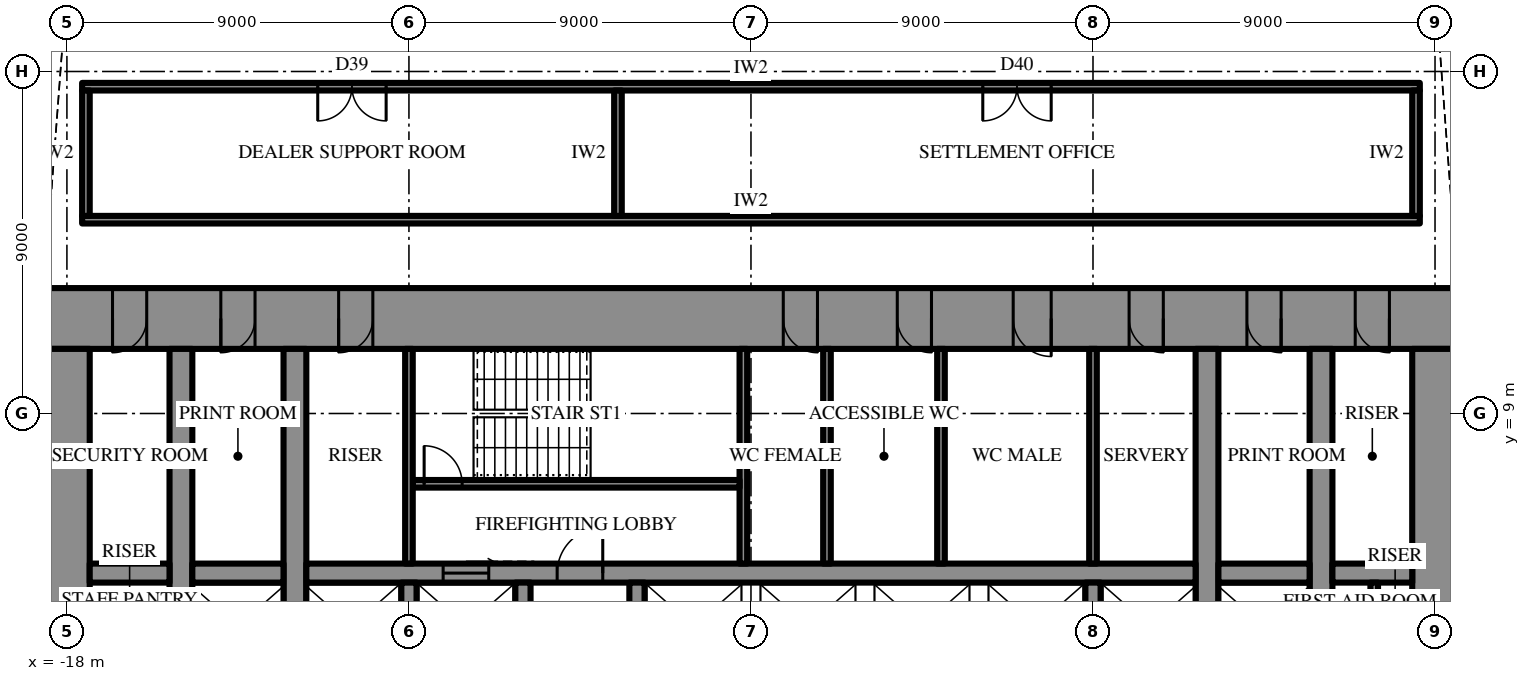
"""IFC4 building model, lengths in metres.
Left out: names, types, materials, properties, quantities, classifications, styles, units other than length and angle.
Written with IfcOpenShell. Run it as: python <this file> out.ifc"""

import sys

from ifc_helpers import new_model, si_unit, direction, frame, frame_2d, origin, place, context, subcontext, project, spatial, rectangle, extrude, element, fill, save


model = new_model("IFC4")
c1 = context("Model", 3, precision=1e-05, world=origin(), true_north=direction((0.0, 1.0)))
c2 = subcontext(c1, "Body", "Model", "MODEL_VIEW")
j1 = project(units=[si_unit("LENGTHUNIT", "METRE"), si_unit("PLANEANGLEUNIT", "RADIAN")], contexts=[c1])
p1 = place(None, origin())
s1 = spatial("IfcSite", under=j1, at=p1, CompositionType="ELEMENT")
p2 = place(p1, origin())
s2 = spatial("IfcBuilding", under=s1, at=p2, CompositionType="ELEMENT")
p3 = place(p2, frame((0.0, 0.0, 140.5)))
s3 = spatial("IfcBuildingStorey", under=s2, at=p3, CompositionType="ELEMENT", Elevation=140.5)
p4 = place(p3, frame((-18.6, 11.5, 0.0), z_axis=(0.0, 0.0, 1.0), x_axis=(1.0, 0.0, 0.0)))
e1 = element("IfcWall", 1, at=p4, inside=s3, PredefinedType="SHEAR", context=c2, shape_type="SweptSolid", body=[
    extrude(rectangle(XDim=37.2, YDim=1.6, at=frame_2d((18.6, 0.0))), origin(), (0.0, 0.0, 1.0), 4.2),
])
p5 = place(p4, frame((19.45, 0.0, 0.0)))
e2 = element("IfcOpeningElement", 2, at=p5, cuts=e1, PredefinedType="OPENING", context=c2, shape_type="SweptSolid", body=[
    extrude(rectangle(XDim=0.9, YDim=2.2, at=frame_2d((0.45, 1.1))), frame((0.0, 0.81, 0.0), z_axis=(0.0, -1.0, 0.0), x_axis=(1.0, 0.0, 0.0)), (0.0, 0.0, 1.0), 1.62),
])
p6 = place(p4, frame((22.45, 0.0, 0.0)))
e3 = element("IfcOpeningElement", 3, at=p6, cuts=e1, PredefinedType="OPENING", context=c2, shape_type="SweptSolid", body=[
    extrude(rectangle(XDim=0.9, YDim=2.2, at=frame_2d((0.45, 1.1))), frame((0.0, 0.81, 0.0), z_axis=(0.0, -1.0, 0.0), x_axis=(1.0, 0.0, 0.0)), (0.0, 0.0, 1.0), 1.62),
])
p7 = place(p4, frame((25.5, 0.0, 0.0)))
e4 = element("IfcOpeningElement", 4, at=p7, cuts=e1, PredefinedType="OPENING", context=c2, shape_type="SweptSolid", body=[
    extrude(rectangle(XDim=1.0, YDim=2.2, at=frame_2d((0.5, 1.1))), frame((0.0, 0.81, 0.0), z_axis=(0.0, -1.0, 0.0), x_axis=(1.0, 0.0, 0.0)), (0.0, 0.0, 1.0), 1.62),
])
p8 = place(p4, frame((1.8, 0.0, 0.0)))
e5 = element("IfcOpeningElement", 5, at=p8, cuts=e1, PredefinedType="OPENING", context=c2, shape_type="SweptSolid", body=[
    extrude(rectangle(XDim=0.9, YDim=2.2, at=frame_2d((0.45, 1.1))), frame((0.0, 0.81, 0.0), z_axis=(0.0, -1.0, 0.0), x_axis=(1.0, 0.0, 0.0)), (0.0, 0.0, 1.0), 1.62),
])
p9 = place(p4, frame((4.65, 0.0, 0.0)))
e6 = element("IfcOpeningElement", 6, at=p9, cuts=e1, PredefinedType="OPENING", context=c2, shape_type="SweptSolid", body=[
    extrude(rectangle(XDim=0.9, YDim=2.2, at=frame_2d((0.45, 1.1))), frame((0.0, 0.81, 0.0), z_axis=(0.0, -1.0, 0.0), x_axis=(1.0, 0.0, 0.0)), (0.0, 0.0, 1.0), 1.62),
])
p10 = place(p4, frame((7.75, 0.0, 0.0)))
e7 = element("IfcOpeningElement", 7, at=p10, cuts=e1, PredefinedType="OPENING", context=c2, shape_type="SweptSolid", body=[
    extrude(rectangle(XDim=0.9, YDim=2.2, at=frame_2d((0.45, 1.1))), frame((0.0, 0.81, 0.0), z_axis=(0.0, -1.0, 0.0), x_axis=(1.0, 0.0, 0.0)), (0.0, 0.0, 1.0), 1.62),
])
p11 = place(p4, frame((28.55, 0.0, 0.0)))
e8 = element("IfcOpeningElement", 8, at=p11, cuts=e1, PredefinedType="OPENING", context=c2, shape_type="SweptSolid", body=[
    extrude(rectangle(XDim=0.9, YDim=2.2, at=frame_2d((0.45, 1.1))), frame((0.0, 0.81, 0.0), z_axis=(0.0, -1.0, 0.0), x_axis=(1.0, 0.0, 0.0)), (0.0, 0.0, 1.0), 1.62),
])
p12 = place(p4, frame((31.65, 0.0, 0.0)))
e9 = element("IfcOpeningElement", 9, at=p12, cuts=e1, PredefinedType="OPENING", context=c2, shape_type="SweptSolid", body=[
    extrude(rectangle(XDim=0.9, YDim=2.2, at=frame_2d((0.45, 1.1))), frame((0.0, 0.81, 0.0), z_axis=(0.0, -1.0, 0.0), x_axis=(1.0, 0.0, 0.0)), (0.0, 0.0, 1.0), 1.62),
])
p13 = place(p4, frame((34.5, 0.0, 0.0)))
e10 = element("IfcOpeningElement", 10, at=p13, cuts=e1, PredefinedType="OPENING", context=c2, shape_type="SweptSolid", body=[
    extrude(rectangle(XDim=0.9, YDim=2.2, at=frame_2d((0.45, 1.1))), frame((0.0, 0.81, 0.0), z_axis=(0.0, -1.0, 0.0), x_axis=(1.0, 0.0, 0.0)), (0.0, 0.0, 1.0), 1.62),
])
p14 = place(p3, frame((18.0, -10.7, 0.0), z_axis=(0.0, 0.0, 1.0), x_axis=(0.0, 1.0, 0.0)))
e11 = element("IfcWall", 11, at=p14, inside=s3, PredefinedType="SHEAR", context=c2, shape_type="SweptSolid", body=[
    extrude(rectangle(XDim=21.4, YDim=1.2, at=frame_2d((10.7, 0.0))), origin(), (0.0, 0.0, 1.0), 4.2),
])
p15 = place(p14, frame((9.8, 0.0, 0.0)))
e12 = element("IfcOpeningElement", 12, at=p15, cuts=e11, PredefinedType="OPENING", context=c2, shape_type="SweptSolid", body=[
    extrude(rectangle(XDim=1.8, YDim=2.4, at=frame_2d((0.9, 1.2))), frame((0.0, 0.61, 0.0), z_axis=(0.0, -1.0, 0.0), x_axis=(1.0, 0.0, 0.0)), (0.0, 0.0, 1.0), 1.22),
])
p16 = place(p3, frame((-18.0, 10.7, 0.0), z_axis=(0.0, 0.0, 1.0), x_axis=(0.0, -1.0, 0.0)))
e13 = element("IfcWall", 13, at=p16, inside=s3, PredefinedType="SHEAR", context=c2, shape_type="SweptSolid", body=[
    extrude(rectangle(XDim=21.4, YDim=1.2, at=frame_2d((10.7, 0.0))), origin(), (0.0, 0.0, 1.0), 4.2),
])
p17 = place(p16, frame((9.8, 0.0, 0.0)))
e14 = element("IfcOpeningElement", 14, at=p17, cuts=e13, PredefinedType="OPENING", context=c2, shape_type="SweptSolid", body=[
    extrude(rectangle(XDim=1.8, YDim=2.4, at=frame_2d((0.9, 1.2))), frame((0.0, 0.61, 0.0), z_axis=(0.0, -1.0, 0.0), x_axis=(1.0, 0.0, 0.0)), (0.0, 0.0, 1.0), 1.22),
])
p18 = place(p3, frame((12.0, -10.7, 0.0), z_axis=(0.0, 0.0, 1.0), x_axis=(0.0, 1.0, 0.0)))
e15 = element("IfcWall", 15, at=p18, inside=s3, PredefinedType="SHEAR", context=c2, shape_type="SweptSolid", body=[
    extrude(rectangle(XDim=21.4, YDim=0.6, at=frame_2d((10.7, 0.0))), origin(), (0.0, 0.0, 1.0), 4.2),
])
p19 = place(p18, frame((9.8, 0.0, 0.0)))
e16 = element("IfcOpeningElement", 16, at=p19, cuts=e15, PredefinedType="OPENING", context=c2, shape_type="SweptSolid", body=[
    extrude(rectangle(XDim=1.8, YDim=2.4, at=frame_2d((0.9, 1.2))), frame((0.0, 0.31, 0.0), z_axis=(0.0, -1.0, 0.0), x_axis=(1.0, 0.0, 0.0)), (0.0, 0.0, 1.0), 0.62),
])
p20 = place(p3, frame((-12.0, -10.7, 0.0), z_axis=(0.0, 0.0, 1.0), x_axis=(0.0, 1.0, 0.0)))
e17 = element("IfcWall", 17, at=p20, inside=s3, PredefinedType="SHEAR", context=c2, shape_type="SweptSolid", body=[
    extrude(rectangle(XDim=21.4, YDim=0.6, at=frame_2d((10.7, 0.0))), origin(), (0.0, 0.0, 1.0), 4.2),
])
p21 = place(p20, frame((9.8, 0.0, 0.0)))
e18 = element("IfcOpeningElement", 18, at=p21, cuts=e17, PredefinedType="OPENING", context=c2, shape_type="SweptSolid", body=[
    extrude(rectangle(XDim=1.8, YDim=2.4, at=frame_2d((0.9, 1.2))), frame((0.0, 0.31, 0.0), z_axis=(0.0, -1.0, 0.0), x_axis=(1.0, 0.0, 0.0)), (0.0, 0.0, 1.0), 0.62),
])
p22 = place(p3, frame((15.0, -10.7, 0.0), z_axis=(0.0, 0.0, 1.0), x_axis=(0.0, 1.0, 0.0)))
e19 = element("IfcWall", 19, at=p22, inside=s3, PredefinedType="SHEAR", context=c2, shape_type="SweptSolid", body=[
    extrude(rectangle(XDim=21.4, YDim=0.6, at=frame_2d((10.7, 0.0))), origin(), (0.0, 0.0, 1.0), 4.2),
])
p23 = place(p22, frame((9.8, 0.0, 0.0)))
e20 = element("IfcOpeningElement", 20, at=p23, cuts=e19, PredefinedType="OPENING", context=c2, shape_type="SweptSolid", body=[
    extrude(rectangle(XDim=1.8, YDim=2.4, at=frame_2d((0.9, 1.2))), frame((0.0, 0.31, 0.0), z_axis=(0.0, -1.0, 0.0), x_axis=(1.0, 0.0, 0.0)), (0.0, 0.0, 1.0), 0.62),
])
p24 = place(p3, frame((-15.0, -10.7, 0.0), z_axis=(0.0, 0.0, 1.0), x_axis=(0.0, 1.0, 0.0)))
e21 = element("IfcWall", 21, at=p24, inside=s3, PredefinedType="SHEAR", context=c2, shape_type="SweptSolid", body=[
    extrude(rectangle(XDim=21.4, YDim=0.6, at=frame_2d((10.7, 0.0))), origin(), (0.0, 0.0, 1.0), 4.2),
])
p25 = place(p24, frame((9.8, 0.0, 0.0)))
e22 = element("IfcOpeningElement", 22, at=p25, cuts=e21, PredefinedType="OPENING", context=c2, shape_type="SweptSolid", body=[
    extrude(rectangle(XDim=1.8, YDim=2.4, at=frame_2d((0.9, 1.2))), frame((0.0, 0.31, 0.0), z_axis=(0.0, -1.0, 0.0), x_axis=(1.0, 0.0, 0.0)), (0.0, 0.0, 1.0), 0.62),
])
p26 = place(p3, frame((-17.4, 4.8, 0.0), z_axis=(0.0, 0.0, 1.0), x_axis=(1.0, 0.0, 0.0)))
e23 = element("IfcWall", 23, at=p26, inside=s3, PredefinedType="SHEAR", context=c2, shape_type="SweptSolid", body=[
    extrude(rectangle(XDim=2.1, YDim=0.5, at=frame_2d((1.05, 0.0))), origin(), (0.0, 0.0, 1.0), 4.2),
])
p27 = place(p3, frame((-14.7, 4.8, 0.0), z_axis=(0.0, 0.0, 1.0), x_axis=(1.0, 0.0, 0.0)))
e24 = element("IfcWall", 24, at=p27, inside=s3, PredefinedType="SHEAR", context=c2, shape_type="SweptSolid", body=[
    extrude(rectangle(XDim=2.4, YDim=0.5, at=frame_2d((1.2, 0.0))), origin(), (0.0, 0.0, 1.0), 4.2),
])
p28 = place(p3, frame((-11.7, 4.8, 0.0), z_axis=(0.0, 0.0, 1.0), x_axis=(1.0, 0.0, 0.0)))
e25 = element("IfcWall", 25, at=p28, inside=s3, PredefinedType="SHEAR", context=c2, shape_type="SweptSolid", body=[
    extrude(rectangle(XDim=23.4, YDim=0.5, at=frame_2d((11.7, 0.0))), origin(), (0.0, 0.0, 1.0), 4.2),
])
p29 = place(p28, frame((6.6, 0.0, 0.0)))
e26 = element("IfcOpeningElement", 26, at=p29, cuts=e25, PredefinedType="OPENING", context=c2, shape_type="SweptSolid", body=[
    extrude(rectangle(XDim=1.2, YDim=2.2, at=frame_2d((0.6, 1.1))), frame((0.0, 0.26, 0.0), z_axis=(0.0, -1.0, 0.0), x_axis=(1.0, 0.0, 0.0)), (0.0, 0.0, 1.0), 0.52),
])
p30 = place(p28, frame((3.6, 0.0, 0.0)))
e27 = element("IfcOpeningElement", 27, at=p30, cuts=e25, PredefinedType="OPENING", context=c2, shape_type="SweptSolid", body=[
    extrude(rectangle(XDim=1.2, YDim=2.2, at=frame_2d((0.6, 1.1))), frame((0.0, 0.26, 0.0), z_axis=(0.0, -1.0, 0.0), x_axis=(1.0, 0.0, 0.0)), (0.0, 0.0, 1.0), 0.52),
])
p31 = place(p3, frame((12.3, 4.8, 0.0), z_axis=(0.0, 0.0, 1.0), x_axis=(1.0, 0.0, 0.0)))
e28 = element("IfcWall", 28, at=p31, inside=s3, PredefinedType="SHEAR", context=c2, shape_type="SweptSolid", body=[
    extrude(rectangle(XDim=2.4, YDim=0.5, at=frame_2d((1.2, 0.0))), origin(), (0.0, 0.0, 1.0), 4.2),
])
p32 = place(p3, frame((15.3, 4.8, 0.0), z_axis=(0.0, 0.0, 1.0), x_axis=(1.0, 0.0, 0.0)))
e29 = element("IfcWall", 29, at=p32, inside=s3, PredefinedType="SHEAR", context=c2, shape_type="SweptSolid", body=[
    extrude(rectangle(XDim=2.1, YDim=0.5, at=frame_2d((1.05, 0.0))), origin(), (0.0, 0.0, 1.0), 4.2),
])
for number, where, z_axis, x_axis in (
    (30, (-9.0, 2.25, 0.0), (0.0, 0.0, 1.0), (0.0, 1.0, 0.0)),
    (31, (-6.0, 2.25, 0.0), (0.0, 0.0, 1.0), (0.0, 1.0, 0.0)),
    (32, (-3.0, 2.25, 0.0), (0.0, 0.0, 1.0), (0.0, 1.0, 0.0)),
    (33, (9.0, 2.25, 0.0), (0.0, 0.0, 1.0), (0.0, 1.0, 0.0)),
):
    element("IfcWall", number, at=place(p3, frame(where, z_axis=z_axis, x_axis=x_axis)), inside=s3, PredefinedType="SHEAR", context=c2, shape_type="SweptSolid", body=[
        extrude(rectangle(XDim=2.3, YDim=0.4, at=frame_2d((1.15, 0.0))), origin(), (0.0, 0.0, 1.0), 4.2),
    ])
p33 = place(p3, frame((-0.2, 5.05, 0.0), z_axis=(0.0, 0.0, 1.0), x_axis=(0.0, 1.0, 0.0)))
e34 = element("IfcWall", 34, at=p33, inside=s3, PredefinedType="SHEAR", context=c2, shape_type="SweptSolid", body=[
    extrude(rectangle(XDim=5.65, YDim=0.2, at=frame_2d((2.825, 0.0))), origin(), (0.0, 0.0, 1.0), 4.2),
])
p34 = place(p3, frame((-8.9, 7.15, 0.0), z_axis=(0.0, 0.0, 1.0), x_axis=(1.0, 0.0, 0.0)))
e35 = element("IfcWall", 35, at=p34, inside=s3, PredefinedType="SHEAR", context=c2, shape_type="SweptSolid", body=[
    extrude(rectangle(XDim=8.6, YDim=0.2, at=frame_2d((4.3, 0.0))), origin(), (0.0, 0.0, 1.0), 4.2),
])
p35 = place(p34, frame((0.3, 0.0, 0.0)))
e36 = element("IfcOpeningElement", 36, at=p35, cuts=e35, PredefinedType="OPENING", context=c2, shape_type="SweptSolid", body=[
    extrude(rectangle(XDim=1.0, YDim=2.2, at=frame_2d((0.5, 1.1))), frame((0.0, 0.11, 0.0), z_axis=(0.0, -1.0, 0.0), x_axis=(1.0, 0.0, 0.0)), (0.0, 0.0, 1.0), 0.22),
])
for number, where, z_axis, x_axis in (
    (37, (-9.0, 5.05, 0.0), (0.0, 0.0, 1.0), (0.0, 1.0, 0.0)),
    (38, (9.0, 5.05, 0.0), (0.0, 0.0, 1.0), (0.0, 1.0, 0.0)),
    (39, (2.0, 5.05, 0.0), (0.0, 0.0, 1.0), (0.0, 1.0, 0.0)),
    (40, (5.0, 5.05, 0.0), (0.0, 0.0, 1.0), (0.0, 1.0, 0.0)),
):
    element("IfcWall", number, at=place(p3, frame(where, z_axis=z_axis, x_axis=x_axis)), inside=s3, PredefinedType="PARTITIONING", context=c2, shape_type="SweptSolid", body=[
        extrude(rectangle(XDim=5.65, YDim=0.2, at=frame_2d((2.825, 0.0))), origin(), (0.0, 0.0, 1.0), 4.0),
    ])
p36 = place(p3, frame((16.4, 3.55, 0.0), z_axis=(0.0, 0.0, 1.0), x_axis=(0.0, 1.0, 0.0)))
e41 = element("IfcWall", 41, at=p36, inside=s3, PredefinedType="PARTITIONING", context=c2, shape_type="SweptSolid", body=[
    extrude(rectangle(XDim=1.0, YDim=0.2, at=frame_2d((0.5, 0.0))), origin(), (0.0, 0.0, 1.0), 4.0),
])
p37 = place(p3, frame((-17.6, 14.1, 0.0), z_axis=(0.0, 0.0, 1.0), x_axis=(1.0, 0.0, 0.0)))
e42 = element("IfcWall", 42, at=p37, inside=s3, PredefinedType="PARTITIONING", context=c2, shape_type="SweptSolid", body=[
    extrude(rectangle(XDim=35.2, YDim=0.2, at=frame_2d((17.6, 0.0))), origin(), (0.0, 0.0, 1.0), 4.0),
])
p38 = place(p3, frame((-17.6, 17.6, 0.0), z_axis=(0.0, 0.0, 1.0), x_axis=(1.0, 0.0, 0.0)))
e43 = element("IfcWall", 43, at=p38, inside=s3, PredefinedType="PARTITIONING", context=c2, shape_type="SweptSolid", body=[
    extrude(rectangle(XDim=35.2, YDim=0.2, at=frame_2d((17.6, 0.0))), origin(), (0.0, 0.0, 1.0), 4.0),
])
p39 = place(p38, frame((6.2, 0.0, 0.0)))
e44 = element("IfcOpeningElement", 44, at=p39, cuts=e43, PredefinedType="OPENING", context=c2, shape_type="SweptSolid", body=[
    extrude(rectangle(XDim=1.8, YDim=2.4, at=frame_2d((0.9, 1.2))), frame((0.0, 0.11, 0.0), z_axis=(0.0, -1.0, 0.0), x_axis=(1.0, 0.0, 0.0)), (0.0, 0.0, 1.0), 0.22),
])
p40 = place(p38, frame((23.7, 0.0, 0.0)))
e45 = element("IfcOpeningElement", 45, at=p40, cuts=e43, PredefinedType="OPENING", context=c2, shape_type="SweptSolid", body=[
    extrude(rectangle(XDim=1.8, YDim=2.4, at=frame_2d((0.9, 1.2))), frame((0.0, 0.11, 0.0), z_axis=(0.0, -1.0, 0.0), x_axis=(1.0, 0.0, 0.0)), (0.0, 0.0, 1.0), 0.22),
])
for number, where, z_axis, x_axis in (
    (46, (-17.5, 14.2, 0.0), (0.0, 0.0, 1.0), (0.0, 1.0, 0.0)),
    (47, (-3.5, 14.2, 0.0), (0.0, 0.0, 1.0), (0.0, 1.0, 0.0)),
    (48, (17.5, 14.2, 0.0), (0.0, 0.0, 1.0), (0.0, 1.0, 0.0)),
):
    element("IfcWall", number, at=place(p3, frame(where, z_axis=z_axis, x_axis=x_axis)), inside=s3, PredefinedType="PARTITIONING", context=c2, shape_type="SweptSolid", body=[
        extrude(rectangle(XDim=3.3, YDim=0.2, at=frame_2d((1.65, 0.0))), origin(), (0.0, 0.0, 1.0), 4.0),
    ])
p41 = place(p29, origin())
e49 = element("IfcDoor", 49, at=p41, inside=s3, OperationType="SINGLE_SWING_LEFT", PredefinedType="DOOR", context=c2, shape_type="SweptSolid", body=[
    extrude(rectangle(XDim=1.2, YDim=2.2, at=frame_2d((0.6, 1.1))), frame((0.0, 0.025, 0.0), z_axis=(0.0, -1.0, 0.0), x_axis=(1.0, 0.0, 0.0)), (0.0, 0.0, 1.0), 0.05),
])
fill(e26, e49)
p42 = place(p35, origin())
e50 = element("IfcDoor", 50, at=p42, inside=s3, OperationType="SINGLE_SWING_RIGHT", PredefinedType="DOOR", context=c2, shape_type="SweptSolid", body=[
    extrude(rectangle(XDim=1.0, YDim=2.2, at=frame_2d((0.5, 1.1))), frame((0.0, 0.025, 0.0), z_axis=(0.0, -1.0, 0.0), x_axis=(1.0, 0.0, 0.0)), (0.0, 0.0, 1.0), 0.05),
])
fill(e36, e50)
p43 = place(p5, frame((0.9, 0.0, 0.0), z_axis=(0.0, 0.0, 1.0), x_axis=(-1.0, 0.0, 0.0)))
e51 = element("IfcDoor", 51, at=p43, inside=s3, OperationType="SINGLE_SWING_RIGHT", PredefinedType="DOOR", context=c2, shape_type="SweptSolid", body=[
    extrude(rectangle(XDim=0.9, YDim=2.2, at=frame_2d((0.45, 1.1))), frame((0.0, 0.025, 0.0), z_axis=(0.0, -1.0, 0.0), x_axis=(1.0, 0.0, 0.0)), (0.0, 0.0, 1.0), 0.05),
])
fill(e2, e51)
p44 = place(p6, frame((0.9, 0.0, 0.0), z_axis=(0.0, 0.0, 1.0), x_axis=(-1.0, 0.0, 0.0)))
e52 = element("IfcDoor", 52, at=p44, inside=s3, OperationType="SINGLE_SWING_RIGHT", PredefinedType="DOOR", context=c2, shape_type="SweptSolid", body=[
    extrude(rectangle(XDim=0.9, YDim=2.2, at=frame_2d((0.45, 1.1))), frame((0.0, 0.025, 0.0), z_axis=(0.0, -1.0, 0.0), x_axis=(1.0, 0.0, 0.0)), (0.0, 0.0, 1.0), 0.05),
])
fill(e3, e52)
p45 = place(p7, frame((1.0, 0.0, 0.0), z_axis=(0.0, 0.0, 1.0), x_axis=(-1.0, 0.0, 0.0)))
e53 = element("IfcDoor", 53, at=p45, inside=s3, OperationType="SINGLE_SWING_RIGHT", PredefinedType="DOOR", context=c2, shape_type="SweptSolid", body=[
    extrude(rectangle(XDim=1.0, YDim=2.2, at=frame_2d((0.5, 1.1))), frame((0.0, 0.025, 0.0), z_axis=(0.0, -1.0, 0.0), x_axis=(1.0, 0.0, 0.0)), (0.0, 0.0, 1.0), 0.05),
])
fill(e4, e53)
p46 = place(p8, frame((0.9, 0.0, 0.0), z_axis=(0.0, 0.0, 1.0), x_axis=(-1.0, 0.0, 0.0)))
e54 = element("IfcDoor", 54, at=p46, inside=s3, OperationType="SINGLE_SWING_LEFT", PredefinedType="DOOR", context=c2, shape_type="SweptSolid", body=[
    extrude(rectangle(XDim=0.9, YDim=2.2, at=frame_2d((0.45, 1.1))), frame((0.0, 0.025, 0.0), z_axis=(0.0, -1.0, 0.0), x_axis=(1.0, 0.0, 0.0)), (0.0, 0.0, 1.0), 0.05),
])
fill(e5, e54)
p47 = place(p9, frame((0.9, 0.0, 0.0), z_axis=(0.0, 0.0, 1.0), x_axis=(-1.0, 0.0, 0.0)))
e55 = element("IfcDoor", 55, at=p47, inside=s3, OperationType="SINGLE_SWING_LEFT", PredefinedType="DOOR", context=c2, shape_type="SweptSolid", body=[
    extrude(rectangle(XDim=0.9, YDim=2.2, at=frame_2d((0.45, 1.1))), frame((0.0, 0.025, 0.0), z_axis=(0.0, -1.0, 0.0), x_axis=(1.0, 0.0, 0.0)), (0.0, 0.0, 1.0), 0.05),
])
fill(e6, e55)
p48 = place(p10, frame((0.9, 0.0, 0.0), z_axis=(0.0, 0.0, 1.0), x_axis=(-1.0, 0.0, 0.0)))
e56 = element("IfcDoor", 56, at=p48, inside=s3, OperationType="SINGLE_SWING_LEFT", PredefinedType="DOOR", context=c2, shape_type="SweptSolid", body=[
    extrude(rectangle(XDim=0.9, YDim=2.2, at=frame_2d((0.45, 1.1))), frame((0.0, 0.025, 0.0), z_axis=(0.0, -1.0, 0.0), x_axis=(1.0, 0.0, 0.0)), (0.0, 0.0, 1.0), 0.05),
])
fill(e7, e56)
p49 = place(p11, frame((0.9, 0.0, 0.0), z_axis=(0.0, 0.0, 1.0), x_axis=(-1.0, 0.0, 0.0)))
e57 = element("IfcDoor", 57, at=p49, inside=s3, OperationType="SINGLE_SWING_RIGHT", PredefinedType="DOOR", context=c2, shape_type="SweptSolid", body=[
    extrude(rectangle(XDim=0.9, YDim=2.2, at=frame_2d((0.45, 1.1))), frame((0.0, 0.025, 0.0), z_axis=(0.0, -1.0, 0.0), x_axis=(1.0, 0.0, 0.0)), (0.0, 0.0, 1.0), 0.05),
])
fill(e8, e57)
p50 = place(p12, frame((0.9, 0.0, 0.0), z_axis=(0.0, 0.0, 1.0), x_axis=(-1.0, 0.0, 0.0)))
e58 = element("IfcDoor", 58, at=p50, inside=s3, OperationType="SINGLE_SWING_RIGHT", PredefinedType="DOOR", context=c2, shape_type="SweptSolid", body=[
    extrude(rectangle(XDim=0.9, YDim=2.2, at=frame_2d((0.45, 1.1))), frame((0.0, 0.025, 0.0), z_axis=(0.0, -1.0, 0.0), x_axis=(1.0, 0.0, 0.0)), (0.0, 0.0, 1.0), 0.05),
])
fill(e9, e58)
p51 = place(p13, frame((0.9, 0.0, 0.0), z_axis=(0.0, 0.0, 1.0), x_axis=(-1.0, 0.0, 0.0)))
e59 = element("IfcDoor", 59, at=p51, inside=s3, OperationType="SINGLE_SWING_RIGHT", PredefinedType="DOOR", context=c2, shape_type="SweptSolid", body=[
    extrude(rectangle(XDim=0.9, YDim=2.2, at=frame_2d((0.45, 1.1))), frame((0.0, 0.025, 0.0), z_axis=(0.0, -1.0, 0.0), x_axis=(1.0, 0.0, 0.0)), (0.0, 0.0, 1.0), 0.05),
])
fill(e10, e59)
p52 = place(p30, origin())
e60 = element("IfcDoor", 60, at=p52, inside=s3, OperationType="SLIDING_TO_LEFT", PredefinedType="DOOR", context=c2, shape_type="SweptSolid", body=[
    extrude(rectangle(XDim=1.2, YDim=2.2, at=frame_2d((0.6, 1.1))), frame((0.0, 0.025, 0.0), z_axis=(0.0, -1.0, 0.0), x_axis=(1.0, 0.0, 0.0)), (0.0, 0.0, 1.0), 0.05),
])
fill(e27, e60)
p53 = place(p39, frame((1.8, 0.0, 0.0), z_axis=(0.0, 0.0, 1.0), x_axis=(-1.0, 0.0, 0.0)))
e61 = element("IfcDoor", 61, at=p53, inside=s3, OperationType="DOUBLE_DOOR_SINGLE_SWING", PredefinedType="DOOR", context=c2, shape_type="SweptSolid", body=[
    extrude(rectangle(XDim=1.8, YDim=2.4, at=frame_2d((0.9, 1.2))), frame((0.0, 0.025, 0.0), z_axis=(0.0, -1.0, 0.0), x_axis=(1.0, 0.0, 0.0)), (0.0, 0.0, 1.0), 0.05),
])
fill(e44, e61)
p54 = place(p40, frame((1.8, 0.0, 0.0), z_axis=(0.0, 0.0, 1.0), x_axis=(-1.0, 0.0, 0.0)))
e62 = element("IfcDoor", 62, at=p54, inside=s3, OperationType="DOUBLE_DOOR_SINGLE_SWING", PredefinedType="DOOR", context=c2, shape_type="SweptSolid", body=[
    extrude(rectangle(XDim=1.8, YDim=2.4, at=frame_2d((0.9, 1.2))), frame((0.0, 0.025, 0.0), z_axis=(0.0, -1.0, 0.0), x_axis=(1.0, 0.0, 0.0)), (0.0, 0.0, 1.0), 0.05),
])
fill(e45, e62)
save(model, sys.argv[1])
